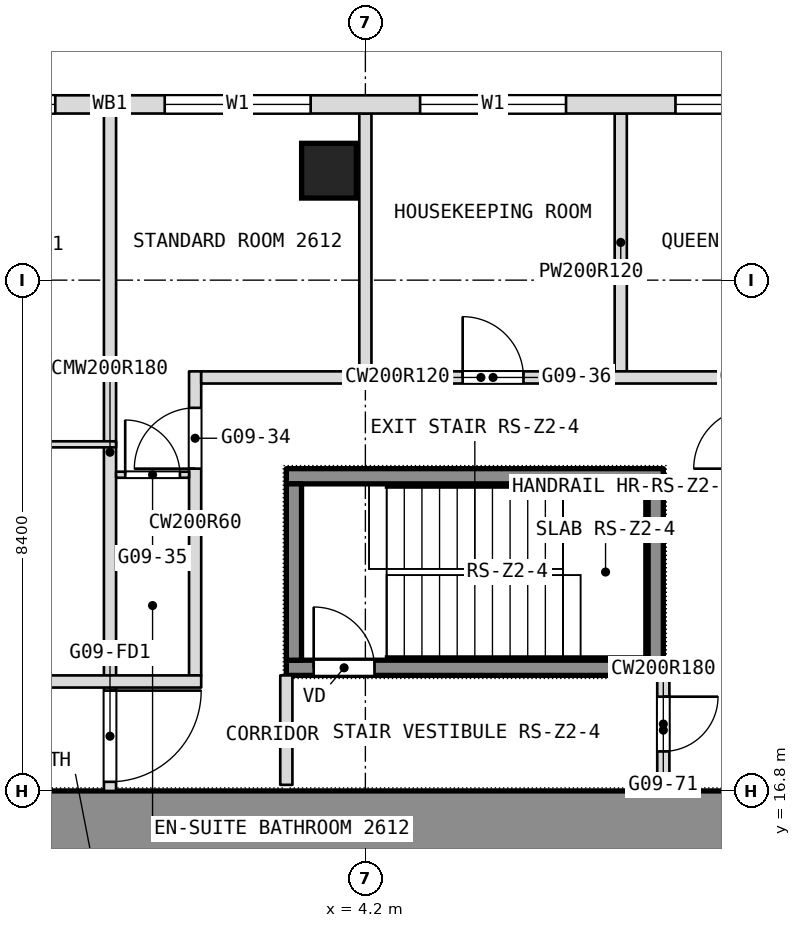
"""IFC4 building model, lengths in metres.
Left out: names, types, materials, properties, quantities, classifications, styles, units other than length and angle.
Written with IfcOpenShell. Run it as: python <this file> out.ifc"""

import sys

from ifc_helpers import new_model, si_unit, direction, frame, frame_2d, origin, origin_2d, place, context, subcontext, project, spatial, rectangle, extrude, element, fill, save


model = new_model("IFC4")
c1 = context("Model", 3, precision=1e-05, world=origin(), true_north=direction((0.0, 1.0)))
c2 = subcontext(c1, "Body", "Model", "MODEL_VIEW")
j1 = project(units=[si_unit("LENGTHUNIT", "METRE"), si_unit("PLANEANGLEUNIT", "RADIAN")], contexts=[c1])
p1 = place(None, origin())
s1 = spatial("IfcSite", under=j1, at=p1, CompositionType="ELEMENT")
p2 = place(p1, origin())
s2 = spatial("IfcBuilding", under=s1, at=p2, CompositionType="ELEMENT")
p3 = place(p2, frame((0.0, 0.0, 119.3)))
s3 = spatial("IfcBuildingStorey", under=s2, at=p3, CompositionType="ELEMENT", Elevation=119.3)
p4 = place(p3, frame((-11.1, 16.3, 0.0), z_axis=(0.0, 0.0, 1.0), x_axis=(1.0, 0.0, 0.0)))
e1 = element("IfcWall", 1, at=p4, inside=s3, PredefinedType="SHEAR", context=c2, shape_type="SweptSolid", body=[
    extrude(rectangle(XDim=22.2, YDim=1.0, at=frame_2d((11.1, 0.0))), origin(), (0.0, 0.0, 1.0), 3.6),
])
p5 = place(p3, frame((3.601, 27.0, 0.0), z_axis=(0.0, 0.0, 1.0), x_axis=(1.0, 0.0, 0.0)))
e2 = element("IfcColumn", 2, at=p5, inside=s3, PredefinedType="COLUMN", context=c2, shape_type="SweptSolid", body=[
    extrude(rectangle(XDim=0.9, YDim=0.9, at=origin_2d()), origin(), (0.0, 0.0, 1.0), 3.6),
])
p6 = place(p3, frame((9.1, 16.9, 0.0), z_axis=(0.0, 0.0, 1.0), x_axis=(0.0, 1.0, 0.0)))
e3 = element("IfcWall", 3, at=p6, inside=s3, PredefinedType="PARTITIONING", context=c2, shape_type="SweptSolid", body=[
    extrude(rectangle(XDim=1.8, YDim=0.2, at=frame_2d((0.9, 0.0))), origin(), (0.0, 0.0, 1.0), 3.34),
])
p7 = place(p6, frame((0.55, 0.0, 0.0)))
e4 = element("IfcOpeningElement", 4, at=p7, cuts=e3, PredefinedType="OPENING", context=c2, shape_type="SweptSolid", body=[
    extrude(rectangle(XDim=0.9, YDim=2.1, at=frame_2d((0.45, 1.05))), frame((0.0, 0.1, 0.0), z_axis=(0.0, -1.0, 0.0), x_axis=(1.0, 0.0, 0.0)), (0.0, 0.0, 1.0), 0.2),
])
for number, where, z_axis, x_axis in (
    (5, (8.4, 23.7, 0.0), (0.0, 0.0, 1.0), (0.0, 1.0, 0.0)),
    (6, (4.2, 23.7, 0.0), (0.0, 0.0, 1.0), (0.0, 1.0, 0.0)),
):
    element("IfcWall", number, at=place(p3, frame(where, z_axis=z_axis, x_axis=x_axis)), inside=s3, PredefinedType="PARTITIONING", context=c2, shape_type="SweptSolid", body=[
        extrude(rectangle(XDim=4.24, YDim=0.2, at=frame_2d((2.12, 0.0))), origin(), (0.0, 0.0, 1.0), 3.34),
    ])
p8 = place(p3, frame((2.9, 16.9, 0.0), z_axis=(0.0, 0.0, 1.0), x_axis=(0.0, 1.0, 0.0)))
e7 = element("IfcWall", 7, at=p8, inside=s3, PredefinedType="PARTITIONING", context=c2, shape_type="SweptSolid", body=[
    extrude(rectangle(XDim=1.8, YDim=0.2, at=frame_2d((0.9, 0.0))), origin(), (0.0, 0.0, 1.0), 3.34),
])
p9 = place(p3, frame((1.4, 18.7, 0.0), z_axis=(0.0, 0.0, 1.0), x_axis=(0.0, 1.0, 0.0)))
e8 = element("IfcWall", 8, at=p9, inside=s3, PredefinedType="PARTITIONING", context=c2, shape_type="SweptSolid", body=[
    extrude(rectangle(XDim=5.0, YDim=0.2, at=frame_2d((2.5, 0.0))), origin(), (0.0, 0.0, 1.0), 3.34),
])
p10 = place(p9, frame((3.4, 0.0, 0.0)))
e9 = element("IfcOpeningElement", 9, at=p10, cuts=e8, PredefinedType="OPENING", context=c2, shape_type="SweptSolid", body=[
    extrude(rectangle(XDim=1.0, YDim=2.1, at=frame_2d((0.5, 1.05))), frame((0.0, 0.1, 0.0), z_axis=(0.0, -1.0, 0.0), x_axis=(1.0, 0.0, 0.0)), (0.0, 0.0, 1.0), 0.2),
])
p11 = place(p3, frame((0.0, 16.8, 0.0), z_axis=(0.0, 0.0, 1.0), x_axis=(0.0, 1.0, 0.0)))
e10 = element("IfcWall", 10, at=p11, inside=s3, PredefinedType="PARTITIONING", context=c2, shape_type="SweptSolid", body=[
    extrude(rectangle(XDim=11.14, YDim=0.2, at=frame_2d((5.57, 0.0))), origin(), (0.0, 0.0, 1.0), 3.34),
])
p12 = place(p11, frame((0.15, 0.0, 0.0)))
e11 = element("IfcOpeningElement", 11, at=p12, cuts=e10, PredefinedType="OPENING", context=c2, shape_type="SweptSolid", body=[
    extrude(rectangle(XDim=1.5, YDim=2.1, at=frame_2d((0.75, 1.05))), frame((0.0, 0.1, 0.0), z_axis=(0.0, -1.0, 0.0), x_axis=(1.0, 0.0, 0.0)), (0.0, 0.0, 1.0), 0.2),
])
p13 = place(p3, frame((-16.9, 18.6, 0.0), z_axis=(0.0, 0.0, 1.0), x_axis=(1.0, 0.0, 0.0)))
e12 = element("IfcWall", 12, at=p13, inside=s3, PredefinedType="PARTITIONING", context=c2, shape_type="SweptSolid", body=[
    extrude(rectangle(XDim=18.4, YDim=0.2, at=frame_2d((9.2, 0.0))), origin(), (0.0, 0.0, 1.0), 3.34),
])
p14 = place(p13, frame((0.5, 0.0, 0.0)))
e13 = element("IfcOpeningElement", 13, at=p14, cuts=e12, PredefinedType="OPENING", context=c2, shape_type="SweptSolid", body=[
    extrude(rectangle(XDim=1.0, YDim=2.1, at=frame_2d((0.5, 1.05))), frame((0.0, 0.1, 0.0), z_axis=(0.0, -1.0, 0.0), x_axis=(1.0, 0.0, 0.0)), (0.0, 0.0, 1.0), 0.2),
])
p15 = place(p13, frame((7.1, 0.0, 0.0)))
e14 = element("IfcOpeningElement", 14, at=p15, cuts=e12, PredefinedType="OPENING", context=c2, shape_type="SweptSolid", body=[
    extrude(rectangle(XDim=1.0, YDim=2.1, at=frame_2d((0.5, 1.05))), frame((0.0, 0.1, 0.0), z_axis=(0.0, -1.0, 0.0), x_axis=(1.0, 0.0, 0.0)), (0.0, 0.0, 1.0), 0.2),
])
p16 = place(p13, frame((8.9, 0.0, 0.0)))
e15 = element("IfcOpeningElement", 15, at=p16, cuts=e12, PredefinedType="OPENING", context=c2, shape_type="SweptSolid", body=[
    extrude(rectangle(XDim=1.0, YDim=2.1, at=frame_2d((0.5, 1.05))), frame((0.0, 0.1, 0.0), z_axis=(0.0, -1.0, 0.0), x_axis=(1.0, 0.0, 0.0)), (0.0, 0.0, 1.0), 0.2),
])
p17 = place(p13, frame((13.1, 0.0, 0.0)))
e16 = element("IfcOpeningElement", 16, at=p17, cuts=e12, PredefinedType="OPENING", context=c2, shape_type="SweptSolid", body=[
    extrude(rectangle(XDim=1.0, YDim=2.1, at=frame_2d((0.5, 1.05))), frame((0.0, 0.1, 0.0), z_axis=(0.0, -1.0, 0.0), x_axis=(1.0, 0.0, 0.0)), (0.0, 0.0, 1.0), 0.2),
])
p18 = place(p3, frame((0.1, 22.0, 0.0), z_axis=(0.0, 0.0, 1.0), x_axis=(1.0, 0.0, 0.0)))
e17 = element("IfcWall", 17, at=p18, inside=s3, PredefinedType="PARTITIONING", context=c2, shape_type="SweptSolid", body=[
    extrude(rectangle(XDim=1.2, YDim=0.1, at=frame_2d((0.6, 0.0))), origin(), (0.0, 0.0, 1.0), 3.34),
])
p19 = place(p18, frame((0.15, 0.0, 0.0)))
e18 = element("IfcOpeningElement", 18, at=p19, cuts=e17, PredefinedType="OPENING", context=c2, shape_type="SweptSolid", body=[
    extrude(rectangle(XDim=0.9, YDim=2.1, at=frame_2d((0.45, 1.05))), frame((0.0, 0.05, 0.0), z_axis=(0.0, -1.0, 0.0), x_axis=(1.0, 0.0, 0.0)), (0.0, 0.0, 1.0), 0.1),
])
p20 = place(p3, frame((-2.45, 22.5, 0.0), z_axis=(0.0, 0.0, 1.0), x_axis=(1.0, 0.0, 0.0)))
e19 = element("IfcWall", 19, at=p20, inside=s3, PredefinedType="PARTITIONING", context=c2, shape_type="SweptSolid", body=[
    extrude(rectangle(XDim=2.55, YDim=0.1, at=frame_2d((1.275, 0.0))), origin(), (0.0, 0.0, 1.0), 3.34),
])
p21 = place(p20, frame((0.15, 0.0, 0.0)))
e20 = element("IfcOpeningElement", 20, at=p21, cuts=e19, PredefinedType="OPENING", context=c2, shape_type="SweptSolid", body=[
    extrude(rectangle(XDim=0.9, YDim=2.1, at=frame_2d((0.45, 1.05))), frame((0.0, 0.05, 0.0), z_axis=(0.0, -1.0, 0.0), x_axis=(1.0, 0.0, 0.0)), (0.0, 0.0, 1.0), 0.1),
])
p22 = place(p3, frame((1.5, 23.6, 0.0), z_axis=(0.0, 0.0, 1.0), x_axis=(1.0, 0.0, 0.0)))
e21 = element("IfcWall", 21, at=p22, inside=s3, PredefinedType="PARTITIONING", context=c2, shape_type="SweptSolid", body=[
    extrude(rectangle(XDim=9.2, YDim=0.2, at=frame_2d((4.6, 0.0))), origin(), (0.0, 0.0, 1.0), 3.34),
])
p23 = place(p22, frame((4.3, 0.0, 0.0)))
e22 = element("IfcOpeningElement", 22, at=p23, cuts=e21, PredefinedType="OPENING", context=c2, shape_type="SweptSolid", body=[
    extrude(rectangle(XDim=1.0, YDim=2.1, at=frame_2d((0.5, 1.05))), frame((0.0, 0.1, 0.0), z_axis=(0.0, -1.0, 0.0), x_axis=(1.0, 0.0, 0.0)), (0.0, 0.0, 1.0), 0.2),
])
p24 = place(p3, frame((21.306, 28.09, 0.0), z_axis=(0.0, 0.0, 1.0), x_axis=(-1.0, 0.0, 0.0)))
e23 = element("IfcWall", 23, at=p24, inside=s3, PredefinedType="NOTDEFINED", context=c2, shape_type="SweptSolid", body=[
    extrude(rectangle(XDim=42.612, YDim=0.3, at=frame_2d((21.306, 0.0))), origin(), (0.0, 0.0, 1.0), 3.6),
])
p25 = place(p24, frame((5.406, 0.0, 0.9)))
e24 = element("IfcOpeningElement", 24, at=p25, cuts=e23, PredefinedType="OPENING", context=c2, shape_type="SweptSolid", body=[
    extrude(rectangle(XDim=2.4, YDim=2.1, at=frame_2d((1.2, 1.05))), frame((0.0, 0.15, 0.0), z_axis=(0.0, -1.0, 0.0), x_axis=(1.0, 0.0, 0.0)), (0.0, 0.0, 1.0), 0.3),
])
p26 = place(p24, frame((9.606, 0.0, 0.9)))
e25 = element("IfcOpeningElement", 25, at=p26, cuts=e23, PredefinedType="OPENING", context=c2, shape_type="SweptSolid", body=[
    extrude(rectangle(XDim=2.4, YDim=2.1, at=frame_2d((1.2, 1.05))), frame((0.0, 0.15, 0.0), z_axis=(0.0, -1.0, 0.0), x_axis=(1.0, 0.0, 0.0)), (0.0, 0.0, 1.0), 0.3),
])
p27 = place(p24, frame((13.806, 0.0, 0.9)))
e26 = element("IfcOpeningElement", 26, at=p27, cuts=e23, PredefinedType="OPENING", context=c2, shape_type="SweptSolid", body=[
    extrude(rectangle(XDim=2.4, YDim=2.1, at=frame_2d((1.2, 1.05))), frame((0.0, 0.15, 0.0), z_axis=(0.0, -1.0, 0.0), x_axis=(1.0, 0.0, 0.0)), (0.0, 0.0, 1.0), 0.3),
])
p28 = place(p24, frame((18.006, 0.0, 0.9)))
e27 = element("IfcOpeningElement", 27, at=p28, cuts=e23, PredefinedType="OPENING", context=c2, shape_type="SweptSolid", body=[
    extrude(rectangle(XDim=2.4, YDim=2.1, at=frame_2d((1.2, 1.05))), frame((0.0, 0.15, 0.0), z_axis=(0.0, -1.0, 0.0), x_axis=(1.0, 0.0, 0.0)), (0.0, 0.0, 1.0), 0.3),
])
p29 = place(p24, frame((22.206, 0.0, 0.9)))
e28 = element("IfcOpeningElement", 28, at=p29, cuts=e23, PredefinedType="OPENING", context=c2, shape_type="SweptSolid", body=[
    extrude(rectangle(XDim=2.4, YDim=2.1, at=frame_2d((1.2, 1.05))), frame((0.0, 0.15, 0.0), z_axis=(0.0, -1.0, 0.0), x_axis=(1.0, 0.0, 0.0)), (0.0, 0.0, 1.0), 0.3),
])
p30 = place(p24, frame((26.406, 0.0, 0.9)))
e29 = element("IfcOpeningElement", 29, at=p30, cuts=e23, PredefinedType="OPENING", context=c2, shape_type="SweptSolid", body=[
    extrude(rectangle(XDim=2.4, YDim=2.1, at=frame_2d((1.2, 1.05))), frame((0.0, 0.15, 0.0), z_axis=(0.0, -1.0, 0.0), x_axis=(1.0, 0.0, 0.0)), (0.0, 0.0, 1.0), 0.3),
])
p31 = place(p24, frame((30.606, 0.0, 0.9)))
e30 = element("IfcOpeningElement", 30, at=p31, cuts=e23, PredefinedType="OPENING", context=c2, shape_type="SweptSolid", body=[
    extrude(rectangle(XDim=2.4, YDim=2.1, at=frame_2d((1.2, 1.05))), frame((0.0, 0.15, 0.0), z_axis=(0.0, -1.0, 0.0), x_axis=(1.0, 0.0, 0.0)), (0.0, 0.0, 1.0), 0.3),
])
p32 = place(p24, frame((34.806, 0.0, 0.9)))
e31 = element("IfcOpeningElement", 31, at=p32, cuts=e23, PredefinedType="OPENING", context=c2, shape_type="SweptSolid", body=[
    extrude(rectangle(XDim=2.4, YDim=2.1, at=frame_2d((1.2, 1.05))), frame((0.0, 0.15, 0.0), z_axis=(0.0, -1.0, 0.0), x_axis=(1.0, 0.0, 0.0)), (0.0, 0.0, 1.0), 0.3),
])
p33 = place(p3, frame((2.9, 18.825, 0.1), z_axis=(0.0, 0.0, 1.0), x_axis=(1.0, 0.0, 0.0)))
e32 = element("IfcWall", 32, at=p33, inside=s3, PredefinedType="SHEAR", context=c2, shape_type="SweptSolid", body=[
    extrude(rectangle(XDim=6.2, YDim=0.25, at=frame_2d((3.1, 0.0))), origin(), (0.0, 0.0, 1.0), 3.6),
])
p34 = place(p33, frame((0.45, 0.0, 0.0)))
e33 = element("IfcOpeningElement", 33, at=p34, cuts=e32, PredefinedType="OPENING", context=c2, shape_type="SweptSolid", body=[
    extrude(rectangle(XDim=1.0, YDim=2.1, at=frame_2d((0.5, 1.05))), frame((0.0, 0.125, 0.0), z_axis=(0.0, -1.0, 0.0), x_axis=(1.0, 0.0, 0.0)), (0.0, 0.0, 1.0), 0.25),
])
p35 = place(p3, frame((2.9, 21.975, 0.1), z_axis=(0.0, 0.0, 1.0), x_axis=(1.0, 0.0, 0.0)))
e34 = element("IfcWall", 34, at=p35, inside=s3, PredefinedType="SHEAR", context=c2, shape_type="SweptSolid", body=[
    extrude(rectangle(XDim=6.2, YDim=0.25, at=frame_2d((3.1, 0.0))), origin(), (0.0, 0.0, 1.0), 3.6),
])
for number, where, z_axis, x_axis in (
    (35, (3.025, 18.95, 0.1), (0.0, 0.0, 1.0), (0.0, 1.0, 0.0)),
    (36, (8.975, 18.95, 0.1), (0.0, 0.0, 1.0), (0.0, 1.0, 0.0)),
):
    element("IfcWall", number, at=place(p3, frame(where, z_axis=z_axis, x_axis=x_axis)), inside=s3, PredefinedType="SHEAR", context=c2, shape_type="SweptSolid", body=[
        extrude(rectangle(XDim=2.9, YDim=0.25, at=frame_2d((1.45, 0.0))), origin(), (0.0, 0.0, 1.0), 3.6),
    ])
p36 = place(p7, origin())
e37 = element("IfcDoor", 37, at=p36, inside=s3, OperationType="SINGLE_SWING_RIGHT", PredefinedType="DOOR", context=c2, shape_type="SweptSolid", body=[
    extrude(rectangle(XDim=0.9, YDim=2.1, at=frame_2d((0.45, 1.05))), frame((0.0, 0.025, 0.0), z_axis=(0.0, -1.0, 0.0), x_axis=(1.0, 0.0, 0.0)), (0.0, 0.0, 1.0), 0.05),
])
fill(e4, e37)
p37 = place(p10, origin())
e38 = element("IfcDoor", 38, at=p37, inside=s3, OperationType="SINGLE_SWING_RIGHT", PredefinedType="DOOR", context=c2, shape_type="SweptSolid", body=[
    extrude(rectangle(XDim=1.0, YDim=2.1, at=frame_2d((0.5, 1.05))), frame((0.0, 0.025, 0.0), z_axis=(0.0, -1.0, 0.0), x_axis=(1.0, 0.0, 0.0)), (0.0, 0.0, 1.0), 0.05),
])
fill(e9, e38)
p38 = place(p19, origin())
e39 = element("IfcDoor", 39, at=p38, inside=s3, OperationType="SINGLE_SWING_LEFT", PredefinedType="DOOR", context=c2, shape_type="SweptSolid", body=[
    extrude(rectangle(XDim=0.9, YDim=2.1, at=frame_2d((0.45, 1.05))), frame((0.0, 0.025, 0.0), z_axis=(0.0, -1.0, 0.0), x_axis=(1.0, 0.0, 0.0)), (0.0, 0.0, 1.0), 0.05),
])
fill(e18, e39)
p39 = place(p23, origin())
e40 = element("IfcDoor", 40, at=p39, inside=s3, OperationType="SINGLE_SWING_LEFT", PredefinedType="DOOR", context=c2, shape_type="SweptSolid", body=[
    extrude(rectangle(XDim=1.0, YDim=2.1, at=frame_2d((0.5, 1.05))), frame((0.0, 0.025, 0.0), z_axis=(0.0, -1.0, 0.0), x_axis=(1.0, 0.0, 0.0)), (0.0, 0.0, 1.0), 0.05),
])
fill(e22, e40)
p40 = place(p26, origin())
e41 = element("IfcWindow", 41, at=p40, inside=s3, PartitioningType="SINGLE_PANEL", PredefinedType="WINDOW", context=c2, shape_type="SweptSolid", body=[
    extrude(rectangle(XDim=2.4, YDim=2.1, at=frame_2d((1.2, 1.05))), frame((0.0, 0.03, 0.0), z_axis=(0.0, -1.0, 0.0), x_axis=(1.0, 0.0, 0.0)), (0.0, 0.0, 1.0), 0.06),
])
fill(e25, e41)
p41 = place(p27, origin())
e42 = element("IfcWindow", 42, at=p41, inside=s3, PartitioningType="SINGLE_PANEL", PredefinedType="WINDOW", context=c2, shape_type="SweptSolid", body=[
    extrude(rectangle(XDim=2.4, YDim=2.1, at=frame_2d((1.2, 1.05))), frame((0.0, 0.03, 0.0), z_axis=(0.0, -1.0, 0.0), x_axis=(1.0, 0.0, 0.0)), (0.0, 0.0, 1.0), 0.06),
])
fill(e26, e42)
p42 = place(p28, origin())
e43 = element("IfcWindow", 43, at=p42, inside=s3, PartitioningType="SINGLE_PANEL", PredefinedType="WINDOW", context=c2, shape_type="SweptSolid", body=[
    extrude(rectangle(XDim=2.4, YDim=2.1, at=frame_2d((1.2, 1.05))), frame((0.0, 0.03, 0.0), z_axis=(0.0, -1.0, 0.0), x_axis=(1.0, 0.0, 0.0)), (0.0, 0.0, 1.0), 0.06),
])
fill(e27, e43)
p43 = place(p29, origin())
e44 = element("IfcWindow", 44, at=p43, inside=s3, PartitioningType="SINGLE_PANEL", PredefinedType="WINDOW", context=c2, shape_type="SweptSolid", body=[
    extrude(rectangle(XDim=2.4, YDim=2.1, at=frame_2d((1.2, 1.05))), frame((0.0, 0.03, 0.0), z_axis=(0.0, -1.0, 0.0), x_axis=(1.0, 0.0, 0.0)), (0.0, 0.0, 1.0), 0.06),
])
fill(e28, e44)
p44 = place(p34, origin())
e45 = element("IfcDoor", 45, at=p44, inside=s3, OperationType="SINGLE_SWING_LEFT", PredefinedType="DOOR", context=c2, shape_type="SweptSolid", body=[
    extrude(rectangle(XDim=1.0, YDim=2.1, at=frame_2d((0.5, 1.05))), frame((0.0, 0.025, 0.0), z_axis=(0.0, -1.0, 0.0), x_axis=(1.0, 0.0, 0.0)), (0.0, 0.0, 1.0), 0.05),
])
fill(e33, e45)
p45 = place(p12, origin())
e46 = element("IfcDoor", 46, at=p45, inside=s3, OperationType="DOUBLE_DOOR_DOUBLE_SWING", PredefinedType="DOOR", context=c2, shape_type="SweptSolid", body=[
    extrude(rectangle(XDim=1.5, YDim=2.1, at=frame_2d((0.75, 1.05))), frame((0.0, 0.025, 0.0), z_axis=(0.0, -1.0, 0.0), x_axis=(1.0, 0.0, 0.0)), (0.0, 0.0, 1.0), 0.05),
])
fill(e11, e46)
save(model, sys.argv[1])
